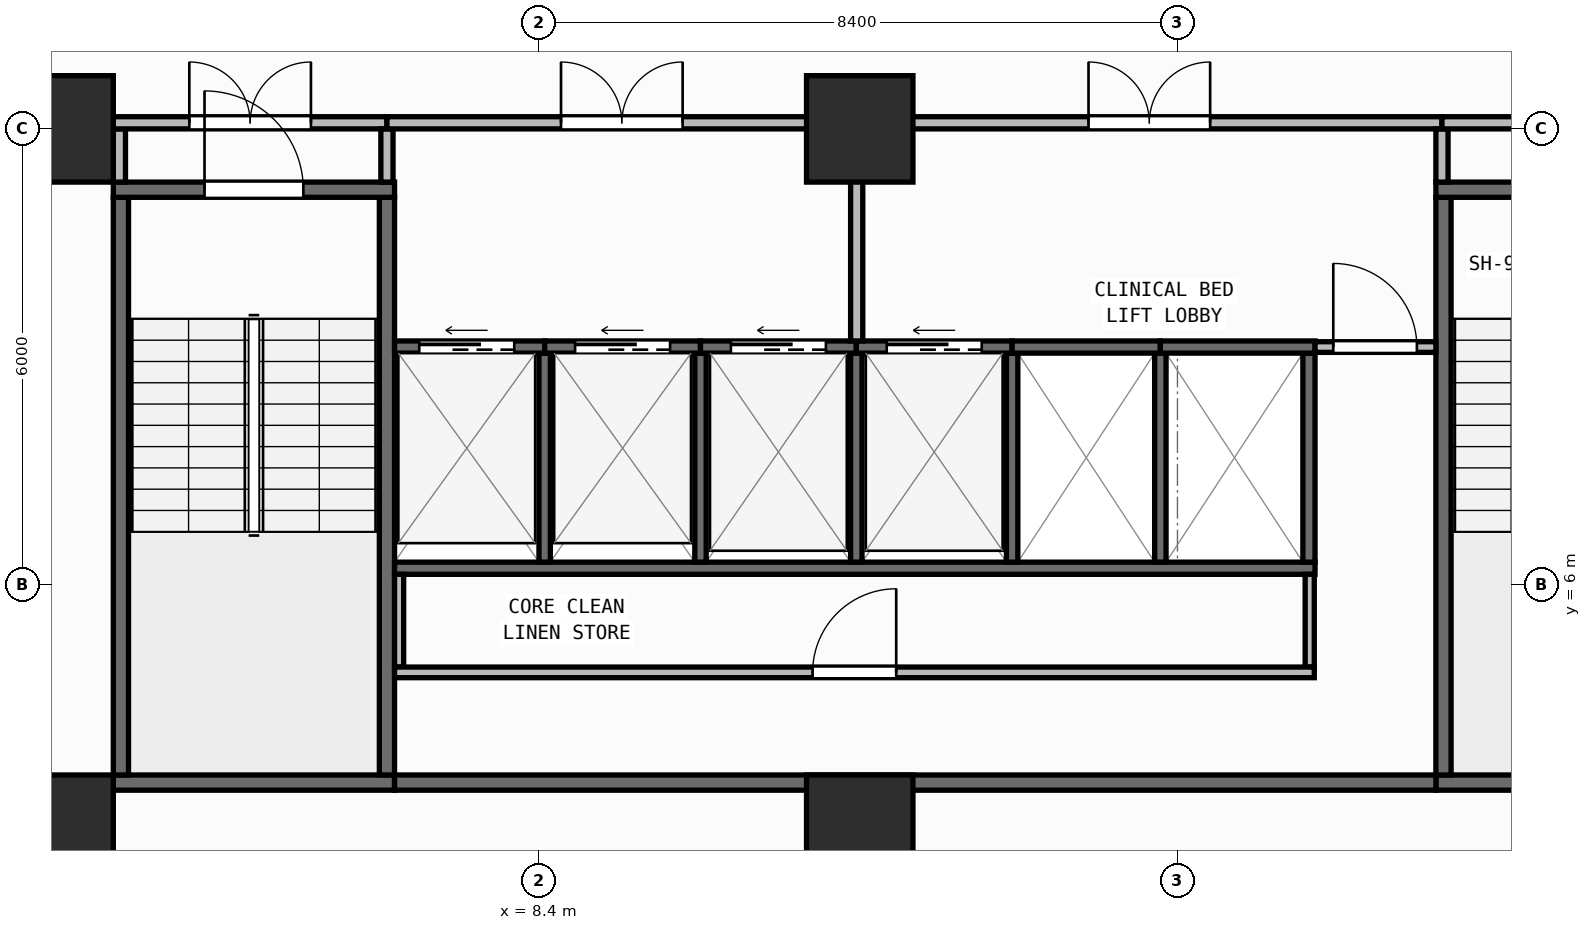
"""IFC4 building model, lengths in metres.
Left out: names, types, materials, properties, quantities, classifications, styles, units other than length and angle.
Written with IfcOpenShell. Run it as: python <this file> out.ifc"""

import sys

from ifc_helpers import new_model, si_unit, direction, frame, frame_2d, origin, origin_2d, place, context, subcontext, project, spatial, rectangle, extrude, element, fill, save


model = new_model("IFC4")
c1 = context("Model", 3, precision=1e-05, world=origin(), true_north=direction((0.0, 1.0)))
c2 = subcontext(c1, "Body", "Model", "MODEL_VIEW")
j1 = project(units=[si_unit("LENGTHUNIT", "METRE"), si_unit("PLANEANGLEUNIT", "RADIAN")], contexts=[c1])
p1 = place(None, origin())
s1 = spatial("IfcSite", under=j1, at=p1, CompositionType="ELEMENT")
p2 = place(p1, origin())
s2 = spatial("IfcBuilding", under=s1, at=p2, CompositionType="ELEMENT")
p3 = place(p2, frame((0.0, 0.0, 69.9)))
s3 = spatial("IfcBuildingStorey", under=s2, at=p3, CompositionType="ELEMENT", Elevation=69.9)
for number, where, z_axis, x_axis in (
    (1, (2.1, 2.8, 0.0), (0.0, 0.0, 1.0), (1.0, 0.0, 0.0)),
    (2, (12.62, 2.8, 0.0), (0.0, 0.0, 1.0), (1.0, 0.0, 0.0)),
    (3, (2.1, 12.0, 0.0), (0.0, 0.0, 1.0), (1.0, 0.0, 0.0)),
    (4, (12.62, 12.0, 0.0), (0.0, 0.0, 1.0), (1.0, 0.0, 0.0)),
):
    element("IfcColumn", number, at=place(p3, frame(where, z_axis=z_axis, x_axis=x_axis)), inside=s3, PredefinedType="COLUMN", context=c2, shape_type="SweptSolid", body=[
        extrude(rectangle(XDim=1.4, YDim=1.4, at=origin_2d()), origin(), (0.0, 0.0, 1.0), 3.95),
    ])
p4 = place(p3, frame((2.76, 0.174, 0.0), z_axis=(0.0, 0.0, 1.0), x_axis=(0.996571478456, 0.082736257641, 0.0)))
e5 = element("IfcWall", 5, at=p4, inside=s3, PredefinedType="STANDARD", context=c2, shape_type="SweptSolid", body=[
    extrude(rectangle(XDim=52.861, YDim=0.26, at=frame_2d((26.431, 0.0))), origin(), (0.0, 0.0, 1.0), 3.71),
])
p5 = place(p4, frame((25.231, 0.0, 0.9)))
e6 = element("IfcOpeningElement", 6, at=p5, cuts=e5, PredefinedType="OPENING", context=c2, shape_type="SweptSolid", body=[
    extrude(rectangle(XDim=2.4, YDim=1.65, at=frame_2d((1.2, 0.825))), frame((0.0, 0.14, 0.0), z_axis=(0.0, -1.0, 0.0), x_axis=(1.0, 0.0, 0.0)), (0.0, 0.0, 1.0), 0.28),
])
p6 = place(p3, frame((2.8, 3.4, 0.0), z_axis=(0.0, 0.0, 1.0), x_axis=(1.0, 0.0, 0.0)))
e7 = element("IfcWall", 7, at=p6, inside=s3, PredefinedType="SHEAR", context=c2, shape_type="SweptSolid", body=[
    extrude(rectangle(XDim=3.7, YDim=0.2, at=frame_2d((1.85, 0.0))), origin(), (0.0, 0.0, 1.0), 3.71),
])
for number, where, z_axis, x_axis in (
    (8, (2.9, 3.5, 0.0), (0.0, 0.0, 1.0), (0.0, 1.0, 0.0)),
    (9, (6.4, 3.5, 0.0), (0.0, 0.0, 1.0), (0.0, 1.0, 0.0)),
):
    element("IfcWall", number, at=place(p3, frame(where, z_axis=z_axis, x_axis=x_axis)), inside=s3, PredefinedType="SHEAR", context=c2, shape_type="SweptSolid", body=[
        extrude(rectangle(XDim=7.6, YDim=0.2, at=frame_2d((3.8, 0.0))), origin(), (0.0, 0.0, 1.0), 3.71),
    ])
p7 = place(p3, frame((2.8, 11.2, 0.0), z_axis=(0.0, 0.0, 1.0), x_axis=(1.0, 0.0, 0.0)))
e10 = element("IfcWall", 10, at=p7, inside=s3, PredefinedType="SHEAR", context=c2, shape_type="SweptSolid", body=[
    extrude(rectangle(XDim=3.7, YDim=0.2, at=frame_2d((1.85, 0.0))), origin(), (0.0, 0.0, 1.0), 3.71),
])
p8 = place(p7, frame((1.2, 0.0, 0.0)))
e11 = element("IfcOpeningElement", 11, at=p8, cuts=e10, PredefinedType="OPENING", context=c2, shape_type="SweptSolid", body=[
    extrude(rectangle(XDim=1.3, YDim=2.15, at=frame_2d((0.65, 1.075))), frame((0.0, 0.11, 0.0), z_axis=(0.0, -1.0, 0.0), x_axis=(1.0, 0.0, 0.0)), (0.0, 0.0, 1.0), 0.22),
])
p9 = place(p3, frame((20.2, 3.4, 0.0), z_axis=(0.0, 0.0, 1.0), x_axis=(1.0, 0.0, 0.0)))
e12 = element("IfcWall", 12, at=p9, inside=s3, PredefinedType="SHEAR", context=c2, shape_type="SweptSolid", body=[
    extrude(rectangle(XDim=3.7, YDim=0.2, at=frame_2d((1.85, 0.0))), origin(), (0.0, 0.0, 1.0), 3.71),
])
p10 = place(p3, frame((20.3, 3.5, 0.0), z_axis=(0.0, 0.0, 1.0), x_axis=(0.0, 1.0, 0.0)))
e13 = element("IfcWall", 13, at=p10, inside=s3, PredefinedType="SHEAR", context=c2, shape_type="SweptSolid", body=[
    extrude(rectangle(XDim=7.6, YDim=0.2, at=frame_2d((3.8, 0.0))), origin(), (0.0, 0.0, 1.0), 3.71),
])
p11 = place(p3, frame((20.2, 11.2, 0.0), z_axis=(0.0, 0.0, 1.0), x_axis=(1.0, 0.0, 0.0)))
e14 = element("IfcWall", 14, at=p11, inside=s3, PredefinedType="SHEAR", context=c2, shape_type="SweptSolid", body=[
    extrude(rectangle(XDim=3.7, YDim=0.2, at=frame_2d((1.85, 0.0))), origin(), (0.0, 0.0, 1.0), 3.71),
])
p12 = place(p11, frame((1.2, 0.0, 0.0)))
e15 = element("IfcOpeningElement", 15, at=p12, cuts=e14, PredefinedType="OPENING", context=c2, shape_type="SweptSolid", body=[
    extrude(rectangle(XDim=1.3, YDim=2.15, at=frame_2d((0.65, 1.075))), frame((0.0, 0.11, 0.0), z_axis=(0.0, -1.0, 0.0), x_axis=(1.0, 0.0, 0.0)), (0.0, 0.0, 1.0), 0.22),
])
p13 = place(p3, frame((6.5, 3.4, 0.0), z_axis=(0.0, 0.0, 1.0), x_axis=(1.0, 0.0, 0.0)))
e16 = element("IfcWall", 16, at=p13, inside=s3, PredefinedType="SHEAR", context=c2, shape_type="SweptSolid", body=[
    extrude(rectangle(XDim=13.7, YDim=0.2, at=frame_2d((6.85, 0.0))), origin(), (0.0, 0.0, 1.0), 3.71),
])
p14 = place(p3, frame((6.5, 6.22, 0.0), z_axis=(0.0, 0.0, 1.0), x_axis=(1.0, 0.0, 0.0)))
e17 = element("IfcWall", 17, at=p14, inside=s3, PredefinedType="SHEAR", context=c2, shape_type="SweptSolid", body=[
    extrude(rectangle(XDim=12.11, YDim=0.16, at=frame_2d((6.055, 0.0))), origin(), (0.0, 0.0, 1.0), 3.71),
])
p15 = place(p3, frame((18.53, 6.3, 0.0), z_axis=(0.0, 0.0, 1.0), x_axis=(0.0, 1.0, 0.0)))
e18 = element("IfcWall", 18, at=p15, inside=s3, PredefinedType="SHEAR", context=c2, shape_type="SweptSolid", body=[
    extrude(rectangle(XDim=2.75, YDim=0.16, at=frame_2d((1.375, 0.0))), origin(), (0.0, 0.0, 1.0), 3.71),
])
for number, where, z_axis, x_axis in (
    (19, (8.475, 6.3, 0.0), (0.0, 0.0, 1.0), (0.0, 1.0, 0.0)),
    (20, (10.525, 6.3, 0.0), (0.0, 0.0, 1.0), (0.0, 1.0, 0.0)),
    (21, (12.575, 6.3, 0.0), (0.0, 0.0, 1.0), (0.0, 1.0, 0.0)),
    (22, (14.625, 6.3, 0.0), (0.0, 0.0, 1.0), (0.0, 1.0, 0.0)),
    (23, (16.575, 6.3, 0.0), (0.0, 0.0, 1.0), (0.0, 1.0, 0.0)),
):
    element("IfcWall", number, at=place(p3, frame(where, z_axis=z_axis, x_axis=x_axis)), inside=s3, PredefinedType="SHEAR", context=c2, shape_type="SweptSolid", body=[
        extrude(rectangle(XDim=2.75, YDim=0.15, at=frame_2d((1.375, 0.0))), origin(), (0.0, 0.0, 1.0), 3.71),
    ])
p16 = place(p3, frame((6.5, 9.13, 0.0), z_axis=(0.0, 0.0, 1.0), x_axis=(1.0, 0.0, 0.0)))
e24 = element("IfcWall", 24, at=p16, inside=s3, PredefinedType="SHEAR", context=c2, shape_type="SweptSolid", body=[
    extrude(rectangle(XDim=1.975, YDim=0.16, at=frame_2d((0.988, 0.0))), origin(), (0.0, 0.0, 1.0), 3.71),
])
p17 = place(p16, frame((0.325, 0.0, 0.0)))
e25 = element("IfcOpeningElement", 25, at=p17, cuts=e24, PredefinedType="OPENING", context=c2, shape_type="SweptSolid", body=[
    extrude(rectangle(XDim=1.25, YDim=2.15, at=frame_2d((0.625, 1.075))), frame((0.0, 0.09, 0.0), z_axis=(0.0, -1.0, 0.0), x_axis=(1.0, 0.0, 0.0)), (0.0, 0.0, 1.0), 0.18),
])
p18 = place(p3, frame((8.475, 9.13, 0.0), z_axis=(0.0, 0.0, 1.0), x_axis=(1.0, 0.0, 0.0)))
e26 = element("IfcWall", 26, at=p18, inside=s3, PredefinedType="SHEAR", context=c2, shape_type="SweptSolid", body=[
    extrude(rectangle(XDim=2.05, YDim=0.16, at=frame_2d((1.025, 0.0))), origin(), (0.0, 0.0, 1.0), 3.71),
])
p19 = place(p18, frame((0.4, 0.0, 0.0)))
e27 = element("IfcOpeningElement", 27, at=p19, cuts=e26, PredefinedType="OPENING", context=c2, shape_type="SweptSolid", body=[
    extrude(rectangle(XDim=1.25, YDim=2.15, at=frame_2d((0.625, 1.075))), frame((0.0, 0.09, 0.0), z_axis=(0.0, -1.0, 0.0), x_axis=(1.0, 0.0, 0.0)), (0.0, 0.0, 1.0), 0.18),
])
p20 = place(p3, frame((10.525, 9.13, 0.0), z_axis=(0.0, 0.0, 1.0), x_axis=(1.0, 0.0, 0.0)))
e28 = element("IfcWall", 28, at=p20, inside=s3, PredefinedType="SHEAR", context=c2, shape_type="SweptSolid", body=[
    extrude(rectangle(XDim=2.05, YDim=0.16, at=frame_2d((1.025, 0.0))), origin(), (0.0, 0.0, 1.0), 3.71),
])
p21 = place(p20, frame((0.4, 0.0, 0.0)))
e29 = element("IfcOpeningElement", 29, at=p21, cuts=e28, PredefinedType="OPENING", context=c2, shape_type="SweptSolid", body=[
    extrude(rectangle(XDim=1.25, YDim=2.15, at=frame_2d((0.625, 1.075))), frame((0.0, 0.09, 0.0), z_axis=(0.0, -1.0, 0.0), x_axis=(1.0, 0.0, 0.0)), (0.0, 0.0, 1.0), 0.18),
])
p22 = place(p3, frame((12.575, 9.13, 0.0), z_axis=(0.0, 0.0, 1.0), x_axis=(1.0, 0.0, 0.0)))
e30 = element("IfcWall", 30, at=p22, inside=s3, PredefinedType="SHEAR", context=c2, shape_type="SweptSolid", body=[
    extrude(rectangle(XDim=2.05, YDim=0.16, at=frame_2d((1.025, 0.0))), origin(), (0.0, 0.0, 1.0), 3.71),
])
p23 = place(p22, frame((0.4, 0.0, 0.0)))
e31 = element("IfcOpeningElement", 31, at=p23, cuts=e30, PredefinedType="OPENING", context=c2, shape_type="SweptSolid", body=[
    extrude(rectangle(XDim=1.25, YDim=2.15, at=frame_2d((0.625, 1.075))), frame((0.0, 0.09, 0.0), z_axis=(0.0, -1.0, 0.0), x_axis=(1.0, 0.0, 0.0)), (0.0, 0.0, 1.0), 0.18),
])
p24 = place(p3, frame((14.625, 9.13, 0.0), z_axis=(0.0, 0.0, 1.0), x_axis=(1.0, 0.0, 0.0)))
e32 = element("IfcWall", 32, at=p24, inside=s3, PredefinedType="SHEAR", context=c2, shape_type="SweptSolid", body=[
    extrude(rectangle(XDim=1.95, YDim=0.16, at=frame_2d((0.975, 0.0))), origin(), (0.0, 0.0, 1.0), 3.71),
])
p25 = place(p3, frame((16.575, 9.13, 0.0), z_axis=(0.0, 0.0, 1.0), x_axis=(1.0, 0.0, 0.0)))
e33 = element("IfcWall", 33, at=p25, inside=s3, PredefinedType="SHEAR", context=c2, shape_type="SweptSolid", body=[
    extrude(rectangle(XDim=2.035, YDim=0.16, at=frame_2d((1.018, 0.0))), origin(), (0.0, 0.0, 1.0), 3.71),
])
for number, where, z_axis, x_axis in (
    (34, (6.56, 4.92, 0.0), (0.0, 0.0, 1.0), (0.0, 1.0, 0.0)),
    (35, (18.54, 4.92, 0.0), (0.0, 0.0, 1.0), (0.0, 1.0, 0.0)),
):
    element("IfcWall", number, at=place(p3, frame(where, z_axis=z_axis, x_axis=x_axis)), inside=s3, PredefinedType="PARTITIONING", context=c2, shape_type="SweptSolid", body=[
        extrude(rectangle(XDim=1.22, YDim=0.12, at=frame_2d((0.61, 0.0))), origin(), (0.0, 0.0, 1.0), 3.71),
    ])
p26 = place(p3, frame((6.5, 4.85, 0.0), z_axis=(0.0, 0.0, 1.0), x_axis=(1.0, 0.0, 0.0)))
e36 = element("IfcWall", 36, at=p26, inside=s3, PredefinedType="PARTITIONING", context=c2, shape_type="SweptSolid", body=[
    extrude(rectangle(XDim=12.1, YDim=0.14, at=frame_2d((6.05, 0.0))), origin(), (0.0, 0.0, 1.0), 3.71),
])
p27 = place(p26, frame((5.5, 0.0, 0.0)))
e37 = element("IfcOpeningElement", 37, at=p27, cuts=e36, PredefinedType="OPENING", context=c2, shape_type="SweptSolid", body=[
    extrude(rectangle(XDim=1.1, YDim=2.1, at=frame_2d((0.55, 1.05))), frame((0.0, 0.08, 0.0), z_axis=(0.0, -1.0, 0.0), x_axis=(1.0, 0.0, 0.0)), (0.0, 0.0, 1.0), 0.16),
])
p28 = place(p3, frame((18.61, 9.13, 0.0), z_axis=(0.0, 0.0, 1.0), x_axis=(1.0, 0.0, 0.0)))
e38 = element("IfcWall", 38, at=p28, inside=s3, PredefinedType="PARTITIONING", context=c2, shape_type="SweptSolid", body=[
    extrude(rectangle(XDim=1.59, YDim=0.14, at=frame_2d((0.795, 0.0))), origin(), (0.0, 0.0, 1.0), 3.71),
])
p29 = place(p28, frame((0.24, 0.0, 0.0)))
e39 = element("IfcOpeningElement", 39, at=p29, cuts=e38, PredefinedType="OPENING", context=c2, shape_type="SweptSolid", body=[
    extrude(rectangle(XDim=1.1, YDim=2.1, at=frame_2d((0.55, 1.05))), frame((0.0, 0.08, 0.0), z_axis=(0.0, -1.0, 0.0), x_axis=(1.0, 0.0, 0.0)), (0.0, 0.0, 1.0), 0.16),
])
p30 = place(p3, frame((2.88, 11.3, 0.0), z_axis=(0.0, 0.0, 1.0), x_axis=(0.0, 1.0, 0.0)))
e40 = element("IfcWall", 40, at=p30, inside=s3, PredefinedType="PARTITIONING", context=c2, shape_type="SweptSolid", body=[
    extrude(rectangle(XDim=0.7, YDim=0.16, at=frame_2d((0.35, 0.0))), origin(), (0.0, 0.0, 1.0), 3.71),
])
p31 = place(p3, frame((2.8, 12.08, 0.0), z_axis=(0.0, 0.0, 1.0), x_axis=(1.0, 0.0, 0.0)))
e41 = element("IfcWall", 41, at=p31, inside=s3, PredefinedType="PARTITIONING", context=c2, shape_type="SweptSolid", body=[
    extrude(rectangle(XDim=3.6, YDim=0.16, at=frame_2d((1.8, 0.0))), origin(), (0.0, 0.0, 1.0), 3.073),
])
p32 = place(p31, frame((1.0, 0.0, 0.0)))
e42 = element("IfcOpeningElement", 42, at=p32, cuts=e41, PredefinedType="OPENING", context=c2, shape_type="SweptSolid", body=[
    extrude(rectangle(XDim=1.6, YDim=2.05, at=frame_2d((0.8, 1.025))), frame((0.0, 0.09, 0.0), z_axis=(0.0, -1.0, 0.0), x_axis=(1.0, 0.0, 0.0)), (0.0, 0.0, 1.0), 0.18),
])
p33 = place(p3, frame((6.4, 11.3, 0.0), z_axis=(0.0, 0.0, 1.0), x_axis=(0.0, 1.0, 0.0)))
e43 = element("IfcWall", 43, at=p33, inside=s3, PredefinedType="PARTITIONING", context=c2, shape_type="SweptSolid", body=[
    extrude(rectangle(XDim=0.7, YDim=0.16, at=frame_2d((0.35, 0.0))), origin(), (0.0, 0.0, 1.0), 3.71),
])
p34 = place(p3, frame((6.4, 12.08, 0.0), z_axis=(0.0, 0.0, 1.0), x_axis=(1.0, 0.0, 0.0)))
e44 = element("IfcWall", 44, at=p34, inside=s3, PredefinedType="PARTITIONING", context=c2, shape_type="SweptSolid", body=[
    extrude(rectangle(XDim=6.18, YDim=0.16, at=frame_2d((3.09, 0.0))), origin(), (0.0, 0.0, 1.0), 3.073),
])
p35 = place(p34, frame((2.29, 0.0, 0.0)))
e45 = element("IfcOpeningElement", 45, at=p35, cuts=e44, PredefinedType="OPENING", context=c2, shape_type="SweptSolid", body=[
    extrude(rectangle(XDim=1.6, YDim=2.05, at=frame_2d((0.8, 1.025))), frame((0.0, 0.09, 0.0), z_axis=(0.0, -1.0, 0.0), x_axis=(1.0, 0.0, 0.0)), (0.0, 0.0, 1.0), 0.18),
])
p36 = place(p3, frame((12.58, 9.21, 0.0), z_axis=(0.0, 0.0, 1.0), x_axis=(0.0, 1.0, 0.0)))
e46 = element("IfcWall", 46, at=p36, inside=s3, PredefinedType="PARTITIONING", context=c2, shape_type="SweptSolid", body=[
    extrude(rectangle(XDim=2.79, YDim=0.16, at=frame_2d((1.395, 0.0))), origin(), (0.0, 0.0, 1.0), 3.71),
])
p37 = place(p3, frame((12.58, 12.08, 0.0), z_axis=(0.0, 0.0, 1.0), x_axis=(1.0, 0.0, 0.0)))
e47 = element("IfcWall", 47, at=p37, inside=s3, PredefinedType="PARTITIONING", context=c2, shape_type="SweptSolid", body=[
    extrude(rectangle(XDim=7.7, YDim=0.16, at=frame_2d((3.85, 0.0))), origin(), (0.0, 0.0, 1.0), 3.073),
])
p38 = place(p37, frame((3.05, 0.0, 0.0)))
e48 = element("IfcOpeningElement", 48, at=p38, cuts=e47, PredefinedType="OPENING", context=c2, shape_type="SweptSolid", body=[
    extrude(rectangle(XDim=1.6, YDim=2.05, at=frame_2d((0.8, 1.025))), frame((0.0, 0.09, 0.0), z_axis=(0.0, -1.0, 0.0), x_axis=(1.0, 0.0, 0.0)), (0.0, 0.0, 1.0), 0.18),
])
p39 = place(p3, frame((20.28, 11.3, 0.0), z_axis=(0.0, 0.0, 1.0), x_axis=(0.0, 1.0, 0.0)))
e49 = element("IfcWall", 49, at=p39, inside=s3, PredefinedType="PARTITIONING", context=c2, shape_type="SweptSolid", body=[
    extrude(rectangle(XDim=0.7, YDim=0.16, at=frame_2d((0.35, 0.0))), origin(), (0.0, 0.0, 1.0), 3.71),
])
p40 = place(p3, frame((20.28, 12.08, 0.0), z_axis=(0.0, 0.0, 1.0), x_axis=(1.0, 0.0, 0.0)))
e50 = element("IfcWall", 50, at=p40, inside=s3, PredefinedType="PARTITIONING", context=c2, shape_type="SweptSolid", body=[
    extrude(rectangle(XDim=3.62, YDim=0.16, at=frame_2d((1.81, 0.0))), origin(), (0.0, 0.0, 1.0), 3.073),
])
p41 = place(p40, frame((1.01, 0.0, 0.0)))
e51 = element("IfcOpeningElement", 51, at=p41, cuts=e50, PredefinedType="OPENING", context=c2, shape_type="SweptSolid", body=[
    extrude(rectangle(XDim=1.6, YDim=2.05, at=frame_2d((0.8, 1.025))), frame((0.0, 0.09, 0.0), z_axis=(0.0, -1.0, 0.0), x_axis=(1.0, 0.0, 0.0)), (0.0, 0.0, 1.0), 0.18),
])
p42 = place(p8, origin())
e52 = element("IfcDoor", 52, at=p42, inside=s3, OperationType="SINGLE_SWING_LEFT", PredefinedType="DOOR", context=c2, shape_type="SweptSolid", body=[
    extrude(rectangle(XDim=1.3, YDim=2.15, at=frame_2d((0.65, 1.075))), frame((0.0, 0.025, 0.0), z_axis=(0.0, -1.0, 0.0), x_axis=(1.0, 0.0, 0.0)), (0.0, 0.0, 1.0), 0.05),
])
fill(e11, e52)
p43 = place(p17, origin())
e53 = element("IfcDoor", 53, at=p43, inside=s3, OperationType="SLIDING_TO_LEFT", PredefinedType="DOOR", context=c2, shape_type="SweptSolid", body=[
    extrude(rectangle(XDim=1.25, YDim=2.15, at=frame_2d((0.625, 1.075))), frame((0.0, 0.025, 0.0), z_axis=(0.0, -1.0, 0.0), x_axis=(1.0, 0.0, 0.0)), (0.0, 0.0, 1.0), 0.05),
])
fill(e25, e53)
p44 = place(p19, origin())
e54 = element("IfcDoor", 54, at=p44, inside=s3, OperationType="SLIDING_TO_LEFT", PredefinedType="DOOR", context=c2, shape_type="SweptSolid", body=[
    extrude(rectangle(XDim=1.25, YDim=2.15, at=frame_2d((0.625, 1.075))), frame((0.0, 0.025, 0.0), z_axis=(0.0, -1.0, 0.0), x_axis=(1.0, 0.0, 0.0)), (0.0, 0.0, 1.0), 0.05),
])
fill(e27, e54)
p45 = place(p21, origin())
e55 = element("IfcDoor", 55, at=p45, inside=s3, OperationType="SLIDING_TO_LEFT", PredefinedType="DOOR", context=c2, shape_type="SweptSolid", body=[
    extrude(rectangle(XDim=1.25, YDim=2.15, at=frame_2d((0.625, 1.075))), frame((0.0, 0.025, 0.0), z_axis=(0.0, -1.0, 0.0), x_axis=(1.0, 0.0, 0.0)), (0.0, 0.0, 1.0), 0.05),
])
fill(e29, e55)
p46 = place(p23, origin())
e56 = element("IfcDoor", 56, at=p46, inside=s3, OperationType="SLIDING_TO_LEFT", PredefinedType="DOOR", context=c2, shape_type="SweptSolid", body=[
    extrude(rectangle(XDim=1.25, YDim=2.15, at=frame_2d((0.625, 1.075))), frame((0.0, 0.025, 0.0), z_axis=(0.0, -1.0, 0.0), x_axis=(1.0, 0.0, 0.0)), (0.0, 0.0, 1.0), 0.05),
])
fill(e31, e56)
p47 = place(p27, origin())
e57 = element("IfcDoor", 57, at=p47, inside=s3, OperationType="SINGLE_SWING_RIGHT", PredefinedType="DOOR", context=c2, shape_type="SweptSolid", body=[
    extrude(rectangle(XDim=1.1, YDim=2.1, at=frame_2d((0.55, 1.05))), frame((0.0, 0.025, 0.0), z_axis=(0.0, -1.0, 0.0), x_axis=(1.0, 0.0, 0.0)), (0.0, 0.0, 1.0), 0.05),
])
fill(e37, e57)
p48 = place(p29, origin())
e58 = element("IfcDoor", 58, at=p48, inside=s3, OperationType="SINGLE_SWING_LEFT", PredefinedType="DOOR", context=c2, shape_type="SweptSolid", body=[
    extrude(rectangle(XDim=1.1, YDim=2.1, at=frame_2d((0.55, 1.05))), frame((0.0, 0.025, 0.0), z_axis=(0.0, -1.0, 0.0), x_axis=(1.0, 0.0, 0.0)), (0.0, 0.0, 1.0), 0.05),
])
fill(e39, e58)
p49 = place(p32, origin())
e59 = element("IfcDoor", 59, at=p49, inside=s3, OperationType="DOUBLE_DOOR_SINGLE_SWING", PredefinedType="DOOR", context=c2, shape_type="SweptSolid", body=[
    extrude(rectangle(XDim=1.6, YDim=2.05, at=frame_2d((0.8, 1.025))), frame((0.0, 0.025, 0.0), z_axis=(0.0, -1.0, 0.0), x_axis=(1.0, 0.0, 0.0)), (0.0, 0.0, 1.0), 0.05),
])
fill(e42, e59)
p50 = place(p35, origin())
e60 = element("IfcDoor", 60, at=p50, inside=s3, OperationType="DOUBLE_DOOR_SINGLE_SWING", PredefinedType="DOOR", context=c2, shape_type="SweptSolid", body=[
    extrude(rectangle(XDim=1.6, YDim=2.05, at=frame_2d((0.8, 1.025))), frame((0.0, 0.025, 0.0), z_axis=(0.0, -1.0, 0.0), x_axis=(1.0, 0.0, 0.0)), (0.0, 0.0, 1.0), 0.05),
])
fill(e45, e60)
p51 = place(p38, origin())
e61 = element("IfcDoor", 61, at=p51, inside=s3, OperationType="DOUBLE_DOOR_SINGLE_SWING", PredefinedType="DOOR", context=c2, shape_type="SweptSolid", body=[
    extrude(rectangle(XDim=1.6, YDim=2.05, at=frame_2d((0.8, 1.025))), frame((0.0, 0.025, 0.0), z_axis=(0.0, -1.0, 0.0), x_axis=(1.0, 0.0, 0.0)), (0.0, 0.0, 1.0), 0.05),
])
fill(e48, e61)
save(model, sys.argv[1])
